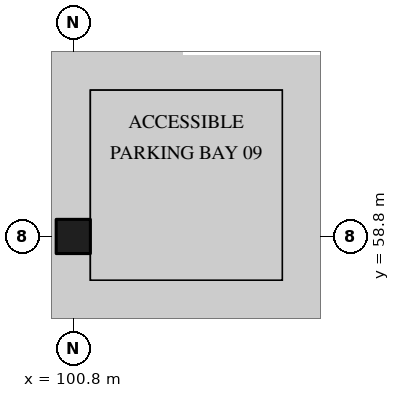
"""IFC4 building model, lengths in metres.
Left out: names, types, materials, properties, quantities, classifications, styles, units other than length and angle.
Written with IfcOpenShell. Run it as: python <this file> out.ifc"""

import sys

from ifc_helpers import new_model, si_unit, direction, frame, origin, origin_2d, place, context, subcontext, project, spatial, rectangle, extrude, element, save


model = new_model("IFC4")
c1 = context("Model", 3, precision=1e-05, world=origin(), true_north=direction((0.0, 1.0)))
c2 = subcontext(c1, "Body", "Model", "MODEL_VIEW")
j1 = project(units=[si_unit("LENGTHUNIT", "METRE"), si_unit("PLANEANGLEUNIT", "RADIAN")], contexts=[c1])
p1 = place(None, origin())
s1 = spatial("IfcSite", under=j1, at=p1, CompositionType="ELEMENT")
p2 = place(p1, origin())
s2 = spatial("IfcBuilding", under=s1, at=p2, CompositionType="ELEMENT")
p3 = place(p2, frame((0.0, 0.0, -4.5)))
s3 = spatial("IfcBuildingStorey", under=s2, at=p3, CompositionType="ELEMENT", Elevation=-4.5)
p4 = place(p3, frame((100.8, 58.8, 0.0), z_axis=(0.0, 0.0, 1.0), x_axis=(1.0, 0.0, 0.0)))
e1 = element("IfcColumn", 1, at=p4, inside=s3, PredefinedType="COLUMN", context=c2, shape_type="SweptSolid", body=[
    extrude(rectangle(XDim=0.9, YDim=0.9, at=origin_2d()), origin(), (0.0, 0.0, 1.0), 4.05),
])
save(model, sys.argv[1])
